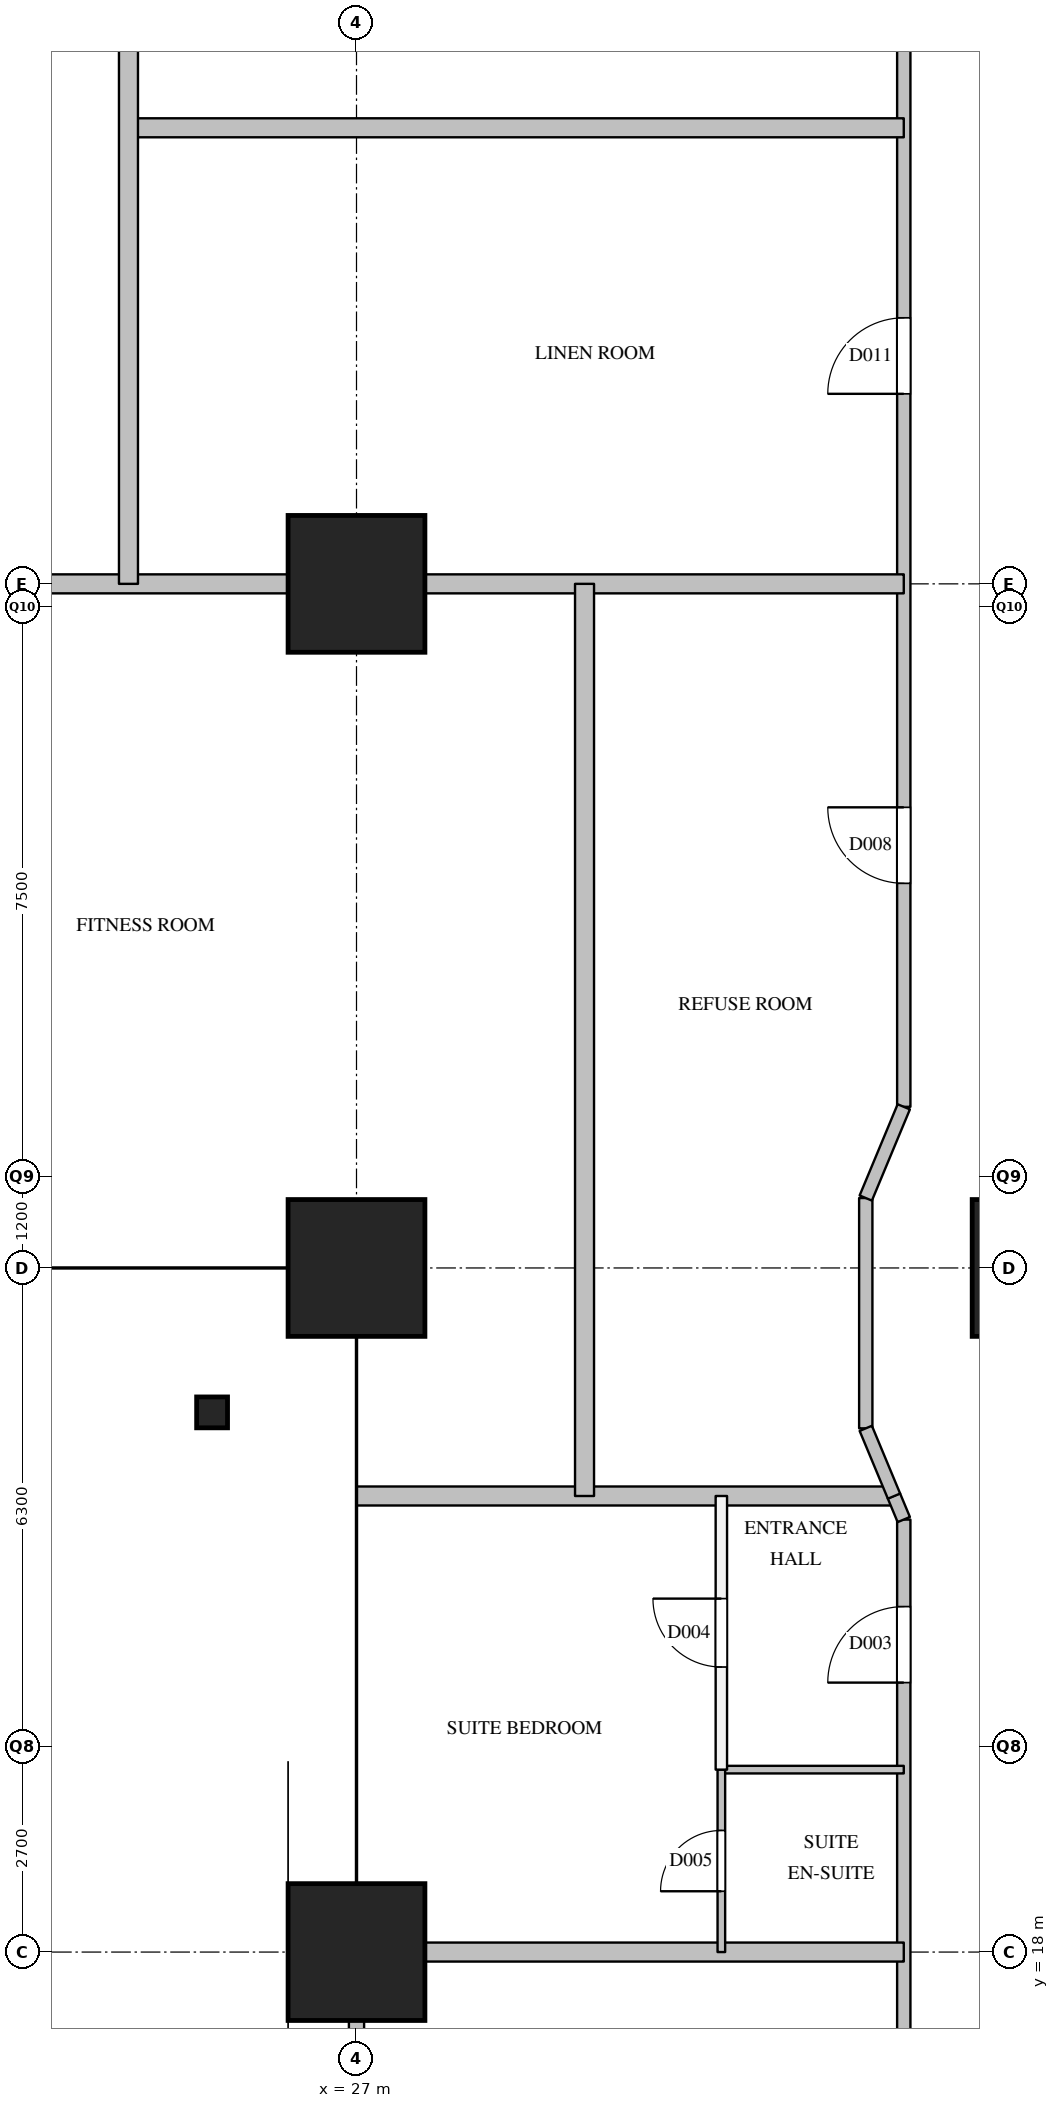
"""IFC4 building model, lengths in metres.
Left out: names, types, materials, properties, quantities, classifications, styles, units other than length and angle.
Written with IfcOpenShell. Run it as: python <this file> out.ifc"""

import sys

from ifc_helpers import new_model, si_unit, direction, frame, frame_2d, origin, origin_2d, place, context, subcontext, project, spatial, rectangle, hollow_rectangle, extrude, element, fill, save


model = new_model("IFC4")
c1 = context("Model", 3, precision=1e-05, world=origin(), true_north=direction((0.0, 1.0)))
c2 = subcontext(c1, "Body", "Model", "MODEL_VIEW")
j1 = project(units=[si_unit("LENGTHUNIT", "METRE"), si_unit("PLANEANGLEUNIT", "RADIAN")], contexts=[c1])
p1 = place(None, origin())
s1 = spatial("IfcSite", under=j1, at=p1, CompositionType="ELEMENT")
p2 = place(p1, origin())
s2 = spatial("IfcBuilding", under=s1, at=p2, CompositionType="ELEMENT")
p3 = place(p2, frame((0.0, 0.0, 77.8)))
s3 = spatial("IfcBuildingStorey", under=s2, at=p3, CompositionType="ELEMENT", Elevation=77.8)
for number, where, z_axis, x_axis in (
    (1, (27.0, 18.0, 0.0), (0.0, 0.0, 1.0), (1.0, 0.0, 0.0)),
    (2, (27.0, 27.0, 0.0), (0.0, 0.0, 1.0), (1.0, 0.0, 0.0)),
    (3, (27.0, 36.0, 0.0), (0.0, 0.0, 1.0), (1.0, 0.0, 0.0)),
    (4, (36.0, 27.0, 0.0), (0.0, 0.0, 1.0), (1.0, 0.0, 0.0)),
):
    element("IfcColumn", number, at=place(p3, frame(where, z_axis=z_axis, x_axis=x_axis)), inside=s3, PredefinedType="COLUMN", context=c2, shape_type="SweptSolid", body=[
        extrude(rectangle(XDim=1.8, YDim=1.8, at=origin_2d()), origin(), (0.0, 0.0, 1.0), 3.8),
    ])
p4 = place(p3, frame((25.1, 25.1, 0.0), z_axis=(0.0, 0.0, 1.0), x_axis=(1.0, 0.0, 0.0)))
e5 = element("IfcColumn", 5, at=p4, inside=s3, PredefinedType="COLUMN", context=c2, shape_type="SweptSolid", body=[
    extrude(hollow_rectangle(XDim=0.406, YDim=0.406, WallThickness=0.015, at=origin_2d()), origin(), (0.0, 0.0, 1.0), 8.467),
])
p5 = place(p3, frame((27.0, 17.1, 0.0), z_axis=(0.0, 0.0, 1.0), x_axis=(0.0, -1.0, 0.0)))
e6 = element("IfcWall", 6, at=p5, inside=s3, PredefinedType="SOLIDWALL", context=c2, shape_type="SweptSolid", body=[
    extrude(rectangle(XDim=7.2, YDim=0.2, at=frame_2d((3.6, 0.0))), origin(), (0.0, 0.0, 1.0), 2.5),
])
p6 = place(p5, frame((2.85, 0.0, 0.0)))
e7 = element("IfcOpeningElement", 7, at=p6, cuts=e6, PredefinedType="OPENING", context=c2, shape_type="SweptSolid", body=[
    extrude(rectangle(XDim=1.5, YDim=2.1, at=frame_2d((0.75, 1.05))), frame((0.0, 0.11, 0.0), z_axis=(0.0, -1.0, 0.0), x_axis=(1.0, 0.0, 0.0)), (0.0, 0.0, 1.0), 0.22),
])
p7 = place(p5, frame((0.45, 0.0, 0.1)))
e8 = element("IfcOpeningElement", 8, at=p7, cuts=e6, PredefinedType="OPENING", context=c2, shape_type="SweptSolid", body=[
    extrude(rectangle(XDim=1.8, YDim=2.1, at=frame_2d((0.9, 1.05))), frame((0.0, 0.11, 0.0), z_axis=(0.0, -1.0, 0.0), x_axis=(1.0, 0.0, 0.0)), (0.0, 0.0, 1.0), 0.22),
])
p8 = place(p5, frame((4.95, 0.0, 0.1)))
e9 = element("IfcOpeningElement", 9, at=p8, cuts=e6, PredefinedType="OPENING", context=c2, shape_type="SweptSolid", body=[
    extrude(rectangle(XDim=1.8, YDim=2.1, at=frame_2d((0.9, 1.05))), frame((0.0, 0.11, 0.0), z_axis=(0.0, -1.0, 0.0), x_axis=(1.0, 0.0, 0.0)), (0.0, 0.0, 1.0), 0.22),
])
p9 = place(p3, frame((33.7, 24.89, 0.0), z_axis=(0.0, 0.0, 1.0), x_axis=(0.0, 1.0, 0.0)))
e10 = element("IfcWall", 10, at=p9, inside=s3, PredefinedType="PARTITIONING", context=c2, shape_type="SweptSolid", body=[
    extrude(rectangle(XDim=3.03, YDim=0.175, at=frame_2d((1.515, 0.0))), origin(), (0.0, 0.0, 1.0), 2.5),
])
p10 = place(p3, frame((34.2, 7.2, 0.0), z_axis=(0.0, 0.0, 1.0), x_axis=(0.0, 1.0, 0.0)))
e11 = element("IfcWall", 11, at=p10, inside=s3, PredefinedType="PARTITIONING", context=c2, shape_type="SweptSolid", body=[
    extrude(rectangle(XDim=16.49, YDim=0.175, at=frame_2d((8.245, 0.0))), origin(), (0.0, 0.0, 1.0), 3.5),
])
p11 = place(p10, frame((4.95, 0.0, 0.0)))
e12 = element("IfcOpeningElement", 12, at=p11, cuts=e11, PredefinedType="OPENING", context=c2, shape_type="SweptSolid", body=[
    extrude(rectangle(XDim=0.9, YDim=2.1, at=frame_2d((0.45, 1.05))), frame((0.0, 0.097, 0.0), z_axis=(0.0, -1.0, 0.0), x_axis=(1.0, 0.0, 0.0)), (0.0, 0.0, 1.0), 0.195),
])
p12 = place(p10, frame((14.345, 0.0, 0.0)))
e13 = element("IfcOpeningElement", 13, at=p12, cuts=e11, PredefinedType="OPENING", context=c2, shape_type="SweptSolid", body=[
    extrude(rectangle(XDim=1.0, YDim=2.1, at=frame_2d((0.5, 1.05))), frame((0.0, 0.097, 0.0), z_axis=(0.0, -1.0, 0.0), x_axis=(1.0, 0.0, 0.0)), (0.0, 0.0, 1.0), 0.195),
])
p13 = place(p3, frame((34.2, 29.12, 0.0), z_axis=(0.0, 0.0, 1.0), x_axis=(0.0, 1.0, 0.0)))
e14 = element("IfcWall", 14, at=p13, inside=s3, PredefinedType="PARTITIONING", context=c2, shape_type="SweptSolid", body=[
    extrude(rectangle(XDim=22.68, YDim=0.175, at=frame_2d((11.34, 0.0))), origin(), (0.0, 0.0, 1.0), 3.5),
])
p14 = place(p13, frame((2.94, 0.0, 0.0)))
e15 = element("IfcOpeningElement", 15, at=p14, cuts=e14, PredefinedType="OPENING", context=c2, shape_type="SweptSolid", body=[
    extrude(rectangle(XDim=1.0, YDim=2.1, at=frame_2d((0.5, 1.05))), frame((0.0, 0.097, 0.0), z_axis=(0.0, -1.0, 0.0), x_axis=(1.0, 0.0, 0.0)), (0.0, 0.0, 1.0), 0.195),
])
p15 = place(p13, frame((9.38, 0.0, 0.0)))
e16 = element("IfcOpeningElement", 16, at=p15, cuts=e14, PredefinedType="OPENING", context=c2, shape_type="SweptSolid", body=[
    extrude(rectangle(XDim=1.0, YDim=2.1, at=frame_2d((0.5, 1.05))), frame((0.0, 0.097, 0.0), z_axis=(0.0, -1.0, 0.0), x_axis=(1.0, 0.0, 0.0)), (0.0, 0.0, 1.0), 0.195),
])
p16 = place(p13, frame((17.33, 0.0, 0.0)))
e17 = element("IfcOpeningElement", 17, at=p16, cuts=e14, PredefinedType="OPENING", context=c2, shape_type="SweptSolid", body=[
    extrude(rectangle(XDim=0.9, YDim=2.1, at=frame_2d((0.45, 1.05))), frame((0.0, 0.097, 0.0), z_axis=(0.0, -1.0, 0.0), x_axis=(1.0, 0.0, 0.0)), (0.0, 0.0, 1.0), 0.195),
])
p17 = place(p3, frame((31.8, 20.4, 0.0), z_axis=(0.0, 0.0, 1.0), x_axis=(0.0, 1.0, 0.0)))
e18 = element("IfcWall", 18, at=p17, inside=s3, PredefinedType="PARTITIONING", context=c2, shape_type="SweptSolid", body=[
    extrude(rectangle(XDim=3.6, YDim=0.15, at=frame_2d((1.8, 0.0))), origin(), (0.0, 0.0, 1.0), 3.5),
])
p18 = place(p17, frame((1.35, 0.0, 0.0)))
e19 = element("IfcOpeningElement", 19, at=p18, cuts=e18, PredefinedType="OPENING", context=c2, shape_type="SweptSolid", body=[
    extrude(rectangle(XDim=0.9, YDim=2.1, at=frame_2d((0.45, 1.05))), frame((0.0, 0.085, 0.0), z_axis=(0.0, -1.0, 0.0), x_axis=(1.0, 0.0, 0.0)), (0.0, 0.0, 1.0), 0.17),
])
p19 = place(p3, frame((27.0, 18.0, 0.0), z_axis=(0.0, 0.0, 1.0), x_axis=(1.0, 0.0, 0.0)))
e20 = element("IfcWall", 20, at=p19, inside=s3, PredefinedType="PARTITIONING", context=c2, shape_type="SweptSolid", body=[
    extrude(rectangle(XDim=7.2, YDim=0.25, at=frame_2d((3.6, 0.0))), origin(), (0.0, 0.0, 1.0), 3.5),
])
p20 = place(p3, frame((27.0, 24.0, 0.0), z_axis=(0.0, 0.0, 1.0), x_axis=(1.0, 0.0, 0.0)))
e21 = element("IfcWall", 21, at=p20, inside=s3, PredefinedType="PARTITIONING", context=c2, shape_type="SweptSolid", body=[
    extrude(rectangle(XDim=7.071, YDim=0.25, at=frame_2d((3.535, 0.0))), origin(), (0.0, 0.0, 1.0), 2.5),
])
p21 = place(p3, frame((19.8, 36.0, 0.0), z_axis=(0.0, 0.0, 1.0), x_axis=(1.0, 0.0, 0.0)))
e22 = element("IfcWall", 22, at=p21, inside=s3, PredefinedType="PARTITIONING", context=c2, shape_type="SweptSolid", body=[
    extrude(rectangle(XDim=14.4, YDim=0.25, at=frame_2d((7.2, 0.0))), origin(), (0.0, 0.0, 1.0), 3.5),
])
p22 = place(p3, frame((24.0, 42.0, 0.0), z_axis=(0.0, 0.0, 1.0), x_axis=(1.0, 0.0, 0.0)))
e23 = element("IfcWall", 23, at=p22, inside=s3, PredefinedType="PARTITIONING", context=c2, shape_type="SweptSolid", body=[
    extrude(rectangle(XDim=10.2, YDim=0.25, at=frame_2d((5.1, 0.0))), origin(), (0.0, 0.0, 1.0), 2.5),
])
p23 = place(p3, frame((24.0, 36.0, 0.0), z_axis=(0.0, 0.0, 1.0), x_axis=(0.0, 1.0, 0.0)))
e24 = element("IfcWall", 24, at=p23, inside=s3, PredefinedType="PARTITIONING", context=c2, shape_type="SweptSolid", body=[
    extrude(rectangle(XDim=18.0, YDim=0.25, at=frame_2d((9.0, 0.0))), origin(), (0.0, 0.0, 1.0), 2.5),
])
p24 = place(p3, frame((30.0, 24.0, 0.0), z_axis=(0.0, 0.0, 1.0), x_axis=(0.0, 1.0, 0.0)))
e25 = element("IfcWall", 25, at=p24, inside=s3, PredefinedType="PARTITIONING", context=c2, shape_type="SweptSolid", body=[
    extrude(rectangle(XDim=12.0, YDim=0.25, at=frame_2d((6.0, 0.0))), origin(), (0.0, 0.0, 1.0), 2.5),
])
p25 = place(p3, frame((31.8, 20.4, 0.0), z_axis=(0.0, 0.0, 1.0), x_axis=(1.0, 0.0, 0.0)))
e26 = element("IfcWall", 26, at=p25, inside=s3, PredefinedType="PARTITIONING", context=c2, shape_type="SweptSolid", body=[
    extrude(rectangle(XDim=2.4, YDim=0.1, at=frame_2d((1.2, 0.0))), origin(), (0.0, 0.0, 1.0), 3.5),
])
p26 = place(p3, frame((31.8, 18.0, 0.0), z_axis=(0.0, 0.0, 1.0), x_axis=(0.0, 1.0, 0.0)))
e27 = element("IfcWall", 27, at=p26, inside=s3, PredefinedType="PARTITIONING", context=c2, shape_type="SweptSolid", body=[
    extrude(rectangle(XDim=2.4, YDim=0.1, at=frame_2d((1.2, 0.0))), origin(), (0.0, 0.0, 1.0), 3.5),
])
p27 = place(p26, frame((0.8, 0.0, 0.0)))
e28 = element("IfcOpeningElement", 28, at=p27, cuts=e27, PredefinedType="OPENING", context=c2, shape_type="SweptSolid", body=[
    extrude(rectangle(XDim=0.8, YDim=2.1, at=frame_2d((0.4, 1.05))), frame((0.0, 0.06, 0.0), z_axis=(0.0, -1.0, 0.0), x_axis=(1.0, 0.0, 0.0)), (0.0, 0.0, 1.0), 0.12),
])
p28 = place(p3, frame((34.2, 23.69, 0.0), z_axis=(0.0, 0.0, 1.0), x_axis=(-0.384307602557, 0.92320510539, 0.0)))
e29 = element("IfcWall", 29, at=p28, inside=s3, PredefinedType="PARTITIONING", context=c2, shape_type="SweptSolid", body=[
    extrude(rectangle(XDim=0.338, YDim=0.175, at=frame_2d((0.169, 0.0))), origin(), (0.0, 0.0, 1.0), 3.5),
])
p29 = place(p3, frame((34.072, 23.998, 0.0), z_axis=(0.0, 0.0, 1.0), x_axis=(-0.384687170746, 0.923047008913, 0.0)))
e30 = element("IfcWall", 30, at=p29, inside=s3, PredefinedType="PARTITIONING", context=c2, shape_type="SweptSolid", body=[
    extrude(rectangle(XDim=0.966, YDim=0.175, at=frame_2d((0.483, 0.0))), origin(), (0.0, 0.0, 1.0), 3.5),
])
p30 = place(p3, frame((33.7, 27.92, 0.0), z_axis=(0.0, 0.0, 1.0), x_axis=(0.384562051588, 0.923099143363, 0.0)))
e31 = element("IfcWall", 31, at=p30, inside=s3, PredefinedType="PARTITIONING", context=c2, shape_type="SweptSolid", body=[
    extrude(rectangle(XDim=1.3, YDim=0.175, at=frame_2d((0.65, 0.0))), origin(), (0.0, 0.0, 1.0), 3.5),
])
p31 = place(p12, origin())
e32 = element("IfcDoor", 32, at=p31, inside=s3, OperationType="SINGLE_SWING_LEFT", PredefinedType="DOOR", context=c2, shape_type="SweptSolid", body=[
    extrude(rectangle(XDim=1.0, YDim=2.1, at=frame_2d((0.5, 1.05))), frame((0.0, 0.025, 0.0), z_axis=(0.0, -1.0, 0.0), x_axis=(1.0, 0.0, 0.0)), (0.0, 0.0, 1.0), 0.05),
])
fill(e13, e32)
p32 = place(p18, origin())
e33 = element("IfcDoor", 33, at=p32, inside=s3, OperationType="SINGLE_SWING_RIGHT", PredefinedType="DOOR", context=c2, shape_type="SweptSolid", body=[
    extrude(rectangle(XDim=0.9, YDim=2.1, at=frame_2d((0.45, 1.05))), frame((0.0, 0.025, 0.0), z_axis=(0.0, -1.0, 0.0), x_axis=(1.0, 0.0, 0.0)), (0.0, 0.0, 1.0), 0.05),
])
fill(e19, e33)
p33 = place(p27, origin())
e34 = element("IfcDoor", 34, at=p33, inside=s3, OperationType="SINGLE_SWING_LEFT", PredefinedType="DOOR", context=c2, shape_type="SweptSolid", body=[
    extrude(rectangle(XDim=0.8, YDim=2.1, at=frame_2d((0.4, 1.05))), frame((0.0, 0.025, 0.0), z_axis=(0.0, -1.0, 0.0), x_axis=(1.0, 0.0, 0.0)), (0.0, 0.0, 1.0), 0.05),
])
fill(e28, e34)
p34 = place(p14, origin())
e35 = element("IfcDoor", 35, at=p34, inside=s3, OperationType="SINGLE_SWING_RIGHT", PredefinedType="DOOR", context=c2, shape_type="SweptSolid", body=[
    extrude(rectangle(XDim=1.0, YDim=2.1, at=frame_2d((0.5, 1.05))), frame((0.0, 0.025, 0.0), z_axis=(0.0, -1.0, 0.0), x_axis=(1.0, 0.0, 0.0)), (0.0, 0.0, 1.0), 0.05),
])
fill(e15, e35)
p35 = place(p15, origin())
e36 = element("IfcDoor", 36, at=p35, inside=s3, OperationType="SINGLE_SWING_LEFT", PredefinedType="DOOR", context=c2, shape_type="SweptSolid", body=[
    extrude(rectangle(XDim=1.0, YDim=2.1, at=frame_2d((0.5, 1.05))), frame((0.0, 0.025, 0.0), z_axis=(0.0, -1.0, 0.0), x_axis=(1.0, 0.0, 0.0)), (0.0, 0.0, 1.0), 0.05),
])
fill(e16, e36)
save(model, sys.argv[1])
